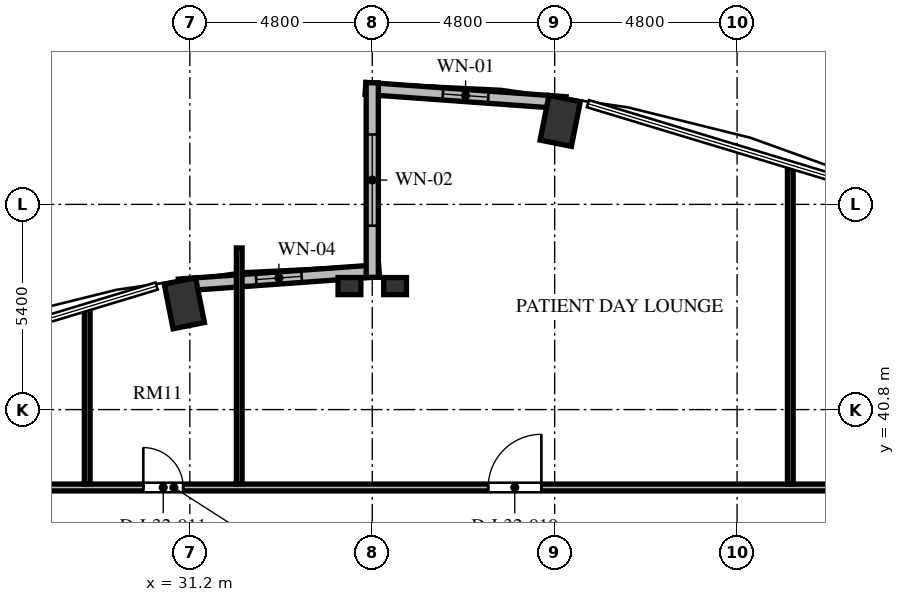
"""IFC4 building model, lengths in metres.
Left out: names, types, materials, properties, quantities, classifications, styles, units other than length and angle.
Written with IfcOpenShell. Run it as: python <this file> out.ifc"""

import sys

from ifc_helpers import new_model, si_unit, direction, frame, frame_2d, origin, origin_2d, place, context, subcontext, project, spatial, rectangle, extrude, element, fill, save


model = new_model("IFC4")
c1 = context("Model", 3, precision=1e-05, world=origin(), true_north=direction((0.0, 1.0)))
c2 = subcontext(c1, "Body", "Model", "MODEL_VIEW")
j1 = project(units=[si_unit("LENGTHUNIT", "METRE"), si_unit("PLANEANGLEUNIT", "RADIAN")], contexts=[c1])
p1 = place(None, origin())
s1 = spatial("IfcSite", under=j1, at=p1, CompositionType="ELEMENT")
p2 = place(p1, origin())
s2 = spatial("IfcBuilding", under=s1, at=p2, CompositionType="ELEMENT")
p3 = place(p2, frame((0.0, 0.0, 125.52)))
s3 = spatial("IfcBuildingStorey", under=s2, at=p3, CompositionType="ELEMENT", Elevation=125.52)
for number, where, z_axis, x_axis in (
    (1, (40.946, 48.397, 0.0), (0.0, 0.0, 1.0), (0.195, 0.981, 0.0)),
    (2, (31.054, 43.597, 0.0), (0.0, 0.0, 1.0), (-0.195, 0.981, 0.0)),
):
    element("IfcColumn", number, at=place(p3, frame(where, z_axis=z_axis, x_axis=x_axis)), inside=s3, PredefinedType="COLUMN", context=c2, shape_type="SweptSolid", body=[
        extrude(rectangle(XDim=1.2, YDim=0.84, at=origin_2d()), origin(), (0.0, 0.0, 1.0), 3.648),
    ])
for number, where, z_axis, x_axis in (
    (3, (35.4, 44.05, 0.0), (0.0, 0.0, 1.0), (1.0, 0.0, 0.0)),
    (4, (36.6, 44.05, 0.0), (0.0, 0.0, 1.0), (1.0, 0.0, 0.0)),
):
    element("IfcColumn", number, at=place(p3, frame(where, z_axis=z_axis, x_axis=x_axis)), inside=s3, PredefinedType="PILASTER", context=c2, shape_type="SweptSolid", body=[
        extrude(rectangle(XDim=0.6, YDim=0.45, at=origin_2d()), origin(), (0.0, 0.0, 1.0), 3.648),
    ])
p4 = place(p3, frame((41.091, 48.875, 0.0), z_axis=(0.0, 0.0, 1.0), x_axis=(-0.997432364291, 0.071614793619, 0.0)))
e5 = element("IfcWall", 5, at=p4, inside=s3, PredefinedType="SOLIDWALL", context=c2, shape_type="SweptSolid", body=[
    extrude(rectangle(XDim=5.284, YDim=0.32, at=frame_2d((2.642, 0.0))), origin(), (0.0, 0.0, 1.0), 3.428),
])
p5 = place(p4, frame((2.042, 0.0, 0.85)))
e6 = element("IfcOpeningElement", 6, at=p5, cuts=e5, PredefinedType="OPENING", context=c2, shape_type="SweptSolid", body=[
    extrude(rectangle(XDim=1.2, YDim=2.2, at=frame_2d((0.6, 1.1))), frame((0.0, 0.17, 0.0), z_axis=(0.0, -1.0, 0.0), x_axis=(1.0, 0.0, 0.0)), (0.0, 0.0, 1.0), 0.34),
])
p6 = place(p3, frame((36.179, 44.453, 0.0), z_axis=(0.0, 0.0, 1.0), x_axis=(-0.997431890304, -0.071621394884, 0.0)))
e7 = element("IfcWall", 7, at=p6, inside=s3, PredefinedType="SOLIDWALL", context=c2, shape_type="SweptSolid", body=[
    extrude(rectangle(XDim=5.284, YDim=0.32, at=frame_2d((2.642, 0.0))), origin(), (0.0, 0.0, 1.0), 3.428),
])
p7 = place(p6, frame((2.042, 0.0, 0.85)))
e8 = element("IfcOpeningElement", 8, at=p7, cuts=e7, PredefinedType="OPENING", context=c2, shape_type="SweptSolid", body=[
    extrude(rectangle(XDim=1.2, YDim=1.8, at=frame_2d((0.6, 0.9))), frame((0.0, 0.17, 0.0), z_axis=(0.0, -1.0, 0.0), x_axis=(1.0, 0.0, 0.0)), (0.0, 0.0, 1.0), 0.34),
])
p8 = place(p3, frame((36.0, 49.4, 0.0), z_axis=(0.0, 0.0, 1.0), x_axis=(0.0, -1.0, 0.0)))
e9 = element("IfcWall", 9, at=p8, inside=s3, PredefinedType="SOLIDWALL", context=c2, shape_type="SweptSolid", body=[
    extrude(rectangle(XDim=5.12, YDim=0.32, at=frame_2d((2.56, 0.0))), origin(), (0.0, 0.0, 1.0), 3.428),
])
p9 = place(p8, frame((1.36, 0.0, 0.84)))
e10 = element("IfcOpeningElement", 10, at=p9, cuts=e9, PredefinedType="OPENING", context=c2, shape_type="SweptSolid", body=[
    extrude(rectangle(XDim=2.4, YDim=2.04, at=frame_2d((1.2, 1.02))), frame((0.0, 0.17, 0.0), z_axis=(0.0, -1.0, 0.0), x_axis=(1.0, 0.0, 0.0)), (0.0, 0.0, 1.0), 0.34),
])
p10 = place(p3, frame((23.31, 38.75, 0.0), z_axis=(0.0, 0.0, 1.0), x_axis=(1.0, 0.0, 0.0)))
e11 = element("IfcWall", 11, at=p10, inside=s3, PredefinedType="PARTITIONING", context=c2, shape_type="SweptSolid", body=[
    extrude(rectangle(XDim=29.88, YDim=0.18, at=frame_2d((14.94, 0.0))), origin(), (0.0, 0.0, 1.0), 3.053),
])
p11 = place(p10, frame((26.101, 0.0, 0.0)))
e12 = element("IfcOpeningElement", 12, at=p11, cuts=e11, PredefinedType="OPENING", context=c2, shape_type="SweptSolid", body=[
    extrude(rectangle(XDim=1.05, YDim=2.15, at=frame_2d((0.525, 1.075))), frame((0.0, 0.1, 0.0), z_axis=(0.0, -1.0, 0.0), x_axis=(1.0, 0.0, 0.0)), (0.0, 0.0, 1.0), 0.2),
])
p12 = place(p10, frame((15.74, 0.0, 0.0)))
e13 = element("IfcOpeningElement", 13, at=p12, cuts=e11, PredefinedType="OPENING", context=c2, shape_type="SweptSolid", body=[
    extrude(rectangle(XDim=1.4, YDim=2.2, at=frame_2d((0.7, 1.1))), frame((0.0, 0.1, 0.0), z_axis=(0.0, -1.0, 0.0), x_axis=(1.0, 0.0, 0.0)), (0.0, 0.0, 1.0), 0.2),
])
p13 = place(p10, frame((6.665, 0.0, 0.0)))
e14 = element("IfcOpeningElement", 14, at=p13, cuts=e11, PredefinedType="OPENING", context=c2, shape_type="SweptSolid", body=[
    extrude(rectangle(XDim=1.05, YDim=2.15, at=frame_2d((0.525, 1.075))), frame((0.0, 0.1, 0.0), z_axis=(0.0, -1.0, 0.0), x_axis=(1.0, 0.0, 0.0)), (0.0, 0.0, 1.0), 0.2),
])
p14 = place(p3, frame((28.5, 38.84, 0.0), z_axis=(0.0, 0.0, 1.0), x_axis=(0.0, 1.0, 0.0)))
e15 = element("IfcWall", 15, at=p14, inside=s3, PredefinedType="PARTITIONING", context=c2, shape_type="SweptSolid", body=[
    extrude(rectangle(XDim=4.645, YDim=0.15, at=frame_2d((2.323, 0.0))), origin(), (0.0, 0.0, 1.0), 3.428),
])
p15 = place(p3, frame((32.5, 38.84, 0.0), z_axis=(0.0, 0.0, 1.0), x_axis=(0.0, 1.0, 0.0)))
e16 = element("IfcWall", 16, at=p15, inside=s3, PredefinedType="PARTITIONING", context=c2, shape_type="SweptSolid", body=[
    extrude(rectangle(XDim=6.214, YDim=0.15, at=frame_2d((3.107, 0.0))), origin(), (0.0, 0.0, 1.0), 3.428),
])
p16 = place(p3, frame((47.0, 38.84, 0.0), z_axis=(0.0, 0.0, 1.0), x_axis=(0.0, 1.0, 0.0)))
e17 = element("IfcWall", 17, at=p16, inside=s3, PredefinedType="PARTITIONING", context=c2, shape_type="SweptSolid", body=[
    extrude(rectangle(XDim=8.387, YDim=0.15, at=frame_2d((4.193, 0.0))), origin(), (0.0, 0.0, 1.0), 3.428),
])
p17 = place(p5, origin())
e18 = element("IfcWindow", 18, at=p17, inside=s3, PartitioningType="SINGLE_PANEL", PredefinedType="WINDOW", context=c2, shape_type="SweptSolid", body=[
    extrude(rectangle(XDim=1.2, YDim=2.2, at=frame_2d((0.6, 1.1))), frame((0.0, 0.03, 0.0), z_axis=(0.0, -1.0, 0.0), x_axis=(1.0, 0.0, 0.0)), (0.0, 0.0, 1.0), 0.06),
])
fill(e6, e18)
p18 = place(p7, origin())
e19 = element("IfcWindow", 19, at=p18, inside=s3, PartitioningType="SINGLE_PANEL", PredefinedType="WINDOW", context=c2, shape_type="SweptSolid", body=[
    extrude(rectangle(XDim=1.2, YDim=1.8, at=frame_2d((0.6, 0.9))), frame((0.0, 0.03, 0.0), z_axis=(0.0, -1.0, 0.0), x_axis=(1.0, 0.0, 0.0)), (0.0, 0.0, 1.0), 0.06),
])
fill(e8, e19)
p19 = place(p9, origin())
e20 = element("IfcWindow", 20, at=p19, inside=s3, PartitioningType="SINGLE_PANEL", PredefinedType="WINDOW", context=c2, shape_type="SweptSolid", body=[
    extrude(rectangle(XDim=2.4, YDim=2.04, at=frame_2d((1.2, 1.02))), frame((0.0, 0.03, 0.0), z_axis=(0.0, -1.0, 0.0), x_axis=(1.0, 0.0, 0.0)), (0.0, 0.0, 1.0), 0.06),
])
fill(e10, e20)
p20 = place(p12, origin())
e21 = element("IfcDoor", 21, at=p20, inside=s3, OperationType="SINGLE_SWING_RIGHT", PredefinedType="DOOR", context=c2, shape_type="SweptSolid", body=[
    extrude(rectangle(XDim=1.4, YDim=2.2, at=frame_2d((0.7, 1.1))), frame((0.0, 0.025, 0.0), z_axis=(0.0, -1.0, 0.0), x_axis=(1.0, 0.0, 0.0)), (0.0, 0.0, 1.0), 0.05),
])
fill(e13, e21)
p21 = place(p13, origin())
e22 = element("IfcDoor", 22, at=p21, inside=s3, OperationType="SINGLE_SWING_LEFT", PredefinedType="DOOR", context=c2, shape_type="SweptSolid", body=[
    extrude(rectangle(XDim=1.05, YDim=2.15, at=frame_2d((0.525, 1.075))), frame((0.0, 0.025, 0.0), z_axis=(0.0, -1.0, 0.0), x_axis=(1.0, 0.0, 0.0)), (0.0, 0.0, 1.0), 0.05),
])
fill(e14, e22)
save(model, sys.argv[1])
